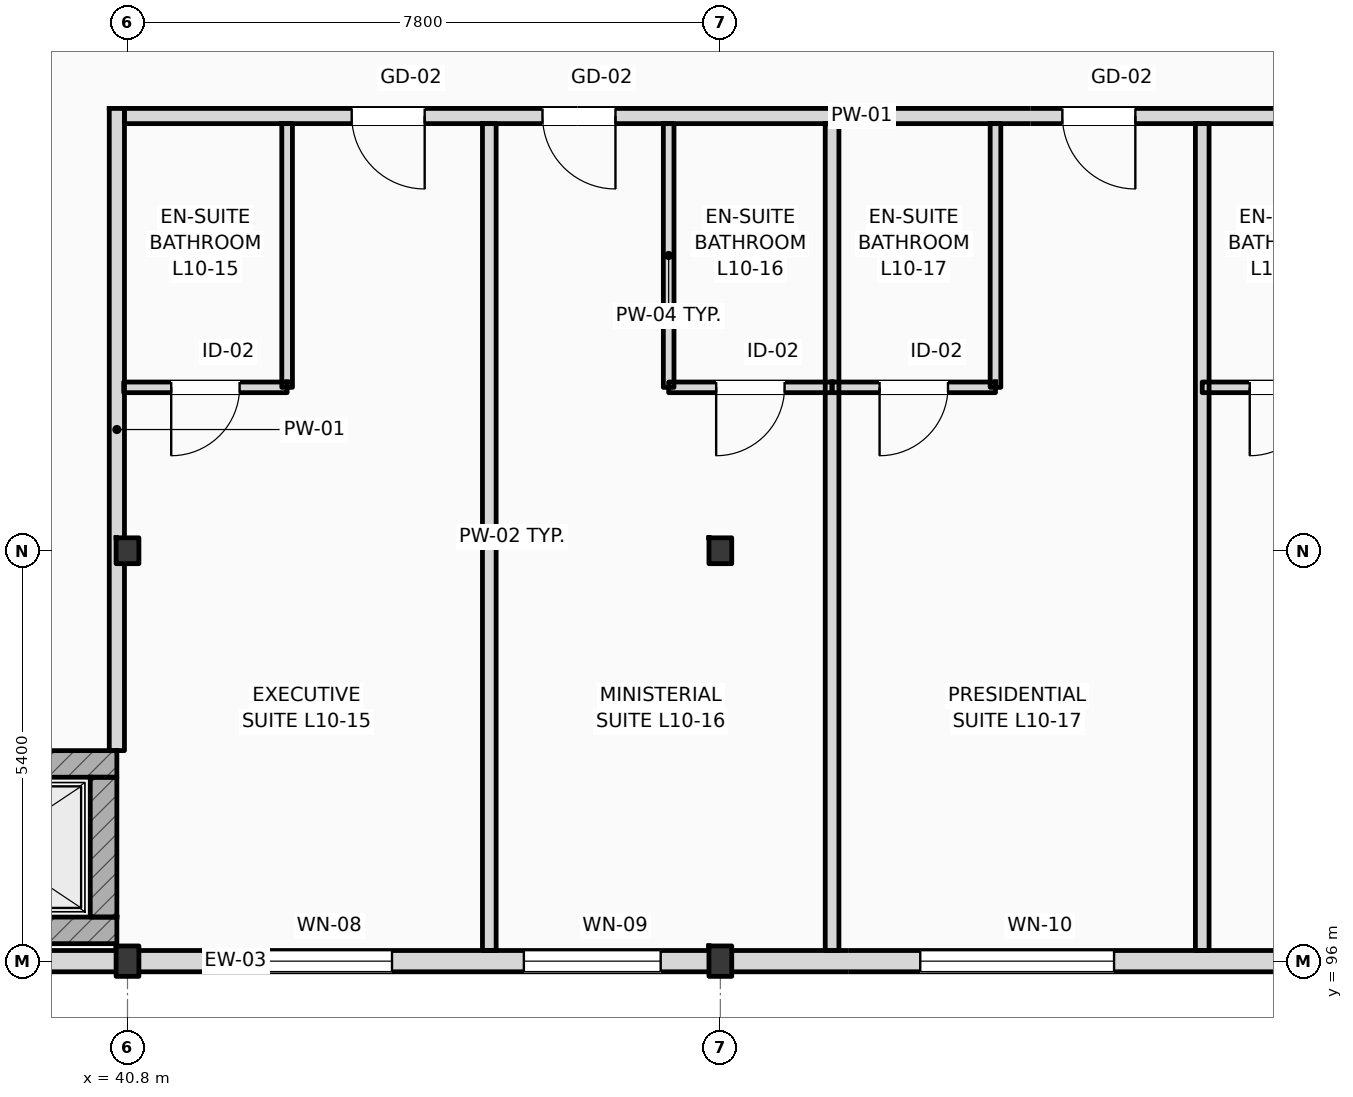
"""IFC4 building model, lengths in metres.
Left out: names, types, materials, properties, quantities, classifications, styles, units other than length and angle.
Written with IfcOpenShell. Run it as: python <this file> out.ifc"""

import sys

from ifc_helpers import new_model, si_unit, direction, frame, frame_2d, origin, origin_2d, place, context, subcontext, project, spatial, rectangle, i_section, extrude, element, fill, save


model = new_model("IFC4")
c1 = context("Model", 3, precision=1e-05, world=origin(), true_north=direction((0.0, 1.0)))
c2 = subcontext(c1, "Body", "Model", "MODEL_VIEW")
j1 = project(units=[si_unit("LENGTHUNIT", "METRE"), si_unit("PLANEANGLEUNIT", "RADIAN")], contexts=[c1])
p1 = place(None, origin())
s1 = spatial("IfcSite", under=j1, at=p1, CompositionType="ELEMENT")
p2 = place(p1, origin())
s2 = spatial("IfcBuilding", under=s1, at=p2, CompositionType="ELEMENT")
p3 = place(p2, frame((0.0, 0.0, 42.6)))
s3 = spatial("IfcBuildingStorey", under=s2, at=p3, CompositionType="ELEMENT", Elevation=42.6)
p4 = place(p3, frame((40.8, 96.0, 0.0), z_axis=(0.0, 0.0, 1.0), x_axis=(1.0, 0.0, 0.0)))
e1 = element("IfcColumn", 1, at=p4, inside=s3, PredefinedType="COLUMN", context=c2, shape_type="SweptSolid", body=[
    extrude(i_section(OverallWidth=0.3, OverallDepth=0.4, WebThickness=0.013, FlangeThickness=0.024, FilletRadius=0.027, at=origin_2d()), origin(), (0.0, 0.0, 1.0), 4.2),
])
p5 = place(p3, frame((40.8, 101.4, 0.0), z_axis=(0.0, 0.0, 1.0), x_axis=(1.0, 0.0, 0.0)))
e2 = element("IfcColumn", 2, at=p5, inside=s3, PredefinedType="COLUMN", context=c2, shape_type="SweptSolid", body=[
    extrude(i_section(OverallWidth=0.3, OverallDepth=0.34, WebThickness=0.012, FlangeThickness=0.021, FilletRadius=0.027, at=origin_2d()), origin(), (0.0, 0.0, 1.0), 4.2),
])
p6 = place(p3, frame((48.6, 96.0, 0.0), z_axis=(0.0, 0.0, 1.0), x_axis=(1.0, 0.0, 0.0)))
e3 = element("IfcColumn", 3, at=p6, inside=s3, PredefinedType="COLUMN", context=c2, shape_type="SweptSolid", body=[
    extrude(i_section(OverallWidth=0.3, OverallDepth=0.4, WebThickness=0.013, FlangeThickness=0.024, FilletRadius=0.027, at=origin_2d()), origin(), (0.0, 0.0, 1.0), 4.2),
])
p7 = place(p3, frame((48.6, 101.4, 0.0), z_axis=(0.0, 0.0, 1.0), x_axis=(1.0, 0.0, 0.0)))
e4 = element("IfcColumn", 4, at=p7, inside=s3, PredefinedType="COLUMN", context=c2, shape_type="SweptSolid", body=[
    extrude(i_section(OverallWidth=0.3, OverallDepth=0.34, WebThickness=0.012, FlangeThickness=0.021, FilletRadius=0.027, at=origin_2d()), origin(), (0.0, 0.0, 1.0), 4.2),
])
p8 = place(p3, frame((25.2, 96.0, 0.0), z_axis=(0.0, 0.0, 1.0), x_axis=(1.0, 0.0, 0.0)))
e5 = element("IfcWall", 5, at=p8, inside=s3, PredefinedType="STANDARD", context=c2, shape_type="SweptSolid", body=[
    extrude(rectangle(XDim=70.2, YDim=0.28, at=frame_2d((35.1, 0.0))), origin(), (0.0, 0.0, 1.0), 3.42),
])
p9 = place(p8, frame((16.83, 0.0, 0.9)))
e6 = element("IfcOpeningElement", 6, at=p9, cuts=e5, PredefinedType="OPENING", context=c2, shape_type="SweptSolid", body=[
    extrude(rectangle(XDim=2.25, YDim=2.15, at=frame_2d((1.125, 1.075))), frame((0.0, 0.15, 0.0), z_axis=(0.0, -1.0, 0.0), x_axis=(1.0, 0.0, 0.0)), (0.0, 0.0, 1.0), 0.3),
])
p10 = place(p8, frame((20.815, 0.0, 0.9)))
e7 = element("IfcOpeningElement", 7, at=p10, cuts=e5, PredefinedType="OPENING", context=c2, shape_type="SweptSolid", body=[
    extrude(rectangle(XDim=1.8, YDim=2.2, at=frame_2d((0.9, 1.1))), frame((0.0, 0.15, 0.0), z_axis=(0.0, -1.0, 0.0), x_axis=(1.0, 0.0, 0.0)), (0.0, 0.0, 1.0), 0.3),
])
p11 = place(p8, frame((26.03, 0.0, 0.9)))
e8 = element("IfcOpeningElement", 8, at=p11, cuts=e5, PredefinedType="OPENING", context=c2, shape_type="SweptSolid", body=[
    extrude(rectangle(XDim=2.55, YDim=2.25, at=frame_2d((1.275, 1.125))), frame((0.0, 0.15, 0.0), z_axis=(0.0, -1.0, 0.0), x_axis=(1.0, 0.0, 0.0)), (0.0, 0.0, 1.0), 0.3),
])
p12 = place(p8, frame((32.045, 0.0, 0.9)))
e9 = element("IfcOpeningElement", 9, at=p12, cuts=e5, PredefinedType="OPENING", context=c2, shape_type="SweptSolid", body=[
    extrude(rectangle(XDim=1.35, YDim=2.3, at=frame_2d((0.675, 1.15))), frame((0.0, 0.15, 0.0), z_axis=(0.0, -1.0, 0.0), x_axis=(1.0, 0.0, 0.0)), (0.0, 0.0, 1.0), 0.3),
])
p13 = place(p8, frame((35.2, 0.0, 0.9)))
e10 = element("IfcOpeningElement", 10, at=p13, cuts=e5, PredefinedType="OPENING", context=c2, shape_type="SweptSolid", body=[
    extrude(rectangle(XDim=2.85, YDim=2.34, at=frame_2d((1.425, 1.17))), frame((0.0, 0.15, 0.0), z_axis=(0.0, -1.0, 0.0), x_axis=(1.0, 0.0, 0.0)), (0.0, 0.0, 1.0), 0.3),
])
p14 = place(p8, frame((55.544, 0.0, 0.9)))
e11 = element("IfcOpeningElement", 11, at=p14, cuts=e5, PredefinedType="OPENING", context=c2, shape_type="SweptSolid", body=[
    extrude(rectangle(XDim=3.0, YDim=2.34, at=frame_2d((1.5, 1.17))), frame((0.0, 0.15, 0.0), z_axis=(0.0, -1.0, 0.0), x_axis=(1.0, 0.0, 0.0)), (0.0, 0.0, 1.0), 0.3),
])
p15 = place(p8, frame((60.151, 0.0, 0.9)))
e12 = element("IfcOpeningElement", 12, at=p15, cuts=e5, PredefinedType="OPENING", context=c2, shape_type="SweptSolid", body=[
    extrude(rectangle(XDim=1.35, YDim=2.34, at=frame_2d((0.675, 1.17))), frame((0.0, 0.15, 0.0), z_axis=(0.0, -1.0, 0.0), x_axis=(1.0, 0.0, 0.0)), (0.0, 0.0, 1.0), 0.3),
])
p16 = place(p8, frame((65.582, 0.0, 0.9)))
e13 = element("IfcOpeningElement", 13, at=p16, cuts=e5, PredefinedType="OPENING", context=c2, shape_type="SweptSolid", body=[
    extrude(rectangle(XDim=3.4, YDim=2.34, at=frame_2d((1.7, 1.17))), frame((0.0, 0.15, 0.0), z_axis=(0.0, -1.0, 0.0), x_axis=(1.0, 0.0, 0.0)), (0.0, 0.0, 1.0), 0.3),
])
p17 = place(p3, frame((37.67, 98.595, 0.0), z_axis=(0.0, 0.0, 1.0), x_axis=(1.0, 0.0, 0.0)))
e14 = element("IfcWall", 14, at=p17, inside=s3, PredefinedType="SHEAR", context=c2, shape_type="SweptSolid", body=[
    extrude(rectangle(XDim=2.99, YDim=0.35, at=frame_2d((1.495, 0.0))), origin(), (0.0, 0.0, 1.0), 3.94),
])
p18 = place(p17, frame((0.695, 0.0, 0.0)))
e15 = element("IfcOpeningElement", 15, at=p18, cuts=e14, PredefinedType="OPENING", context=c2, shape_type="SweptSolid", body=[
    extrude(rectangle(XDim=1.25, YDim=2.25, at=frame_2d((0.625, 1.125))), frame((0.0, 0.185, 0.0), z_axis=(0.0, -1.0, 0.0), x_axis=(1.0, 0.0, 0.0)), (0.0, 0.0, 1.0), 0.37),
])
p19 = place(p3, frame((37.67, 96.405, 0.0), z_axis=(0.0, 0.0, 1.0), x_axis=(1.0, 0.0, 0.0)))
e16 = element("IfcWall", 16, at=p19, inside=s3, PredefinedType="SHEAR", context=c2, shape_type="SweptSolid", body=[
    extrude(rectangle(XDim=2.99, YDim=0.35, at=frame_2d((1.495, 0.0))), origin(), (0.0, 0.0, 1.0), 3.94),
])
p20 = place(p3, frame((40.485, 96.58, 0.0), z_axis=(0.0, 0.0, 1.0), x_axis=(0.0, 1.0, 0.0)))
e17 = element("IfcWall", 17, at=p20, inside=s3, PredefinedType="SHEAR", context=c2, shape_type="SweptSolid", body=[
    extrude(rectangle(XDim=1.84, YDim=0.35, at=frame_2d((0.92, 0.0))), origin(), (0.0, 0.0, 1.0), 3.57),
])
p21 = place(p3, frame((40.76, 107.12, 0.0), z_axis=(0.0, 0.0, 1.0), x_axis=(1.0, 0.0, 0.0)))
e18 = element("IfcWall", 18, at=p21, inside=s3, PredefinedType="PARTITIONING", context=c2, shape_type="SweptSolid", body=[
    extrude(rectangle(XDim=23.44, YDim=0.2, at=frame_2d((11.72, 0.0))), origin(), (0.0, 0.0, 1.0), 3.94),
])
p22 = place(p21, frame((2.99, 0.0, 0.0)))
e19 = element("IfcOpeningElement", 19, at=p22, cuts=e18, PredefinedType="OPENING", context=c2, shape_type="SweptSolid", body=[
    extrude(rectangle(XDim=0.96, YDim=2.2, at=frame_2d((0.48, 1.1))), frame((0.0, 0.11, 0.0), z_axis=(0.0, -1.0, 0.0), x_axis=(1.0, 0.0, 0.0)), (0.0, 0.0, 1.0), 0.22),
])
p23 = place(p21, frame((5.5, 0.0, 0.0)))
e20 = element("IfcOpeningElement", 20, at=p23, cuts=e18, PredefinedType="OPENING", context=c2, shape_type="SweptSolid", body=[
    extrude(rectangle(XDim=0.96, YDim=2.2, at=frame_2d((0.48, 1.1))), frame((0.0, 0.11, 0.0), z_axis=(0.0, -1.0, 0.0), x_axis=(1.0, 0.0, 0.0)), (0.0, 0.0, 1.0), 0.22),
])
p24 = place(p21, frame((12.34, 0.0, 0.0)))
e21 = element("IfcOpeningElement", 21, at=p24, cuts=e18, PredefinedType="OPENING", context=c2, shape_type="SweptSolid", body=[
    extrude(rectangle(XDim=0.96, YDim=2.2, at=frame_2d((0.48, 1.1))), frame((0.0, 0.11, 0.0), z_axis=(0.0, -1.0, 0.0), x_axis=(1.0, 0.0, 0.0)), (0.0, 0.0, 1.0), 0.22),
])
p25 = place(p21, frame((17.03, 0.0, 0.0)))
e22 = element("IfcOpeningElement", 22, at=p25, cuts=e18, PredefinedType="OPENING", context=c2, shape_type="SweptSolid", body=[
    extrude(rectangle(XDim=0.96, YDim=2.2, at=frame_2d((0.48, 1.1))), frame((0.0, 0.11, 0.0), z_axis=(0.0, -1.0, 0.0), x_axis=(1.0, 0.0, 0.0)), (0.0, 0.0, 1.0), 0.22),
])
p26 = place(p21, frame((19.51, 0.0, 0.0)))
e23 = element("IfcOpeningElement", 23, at=p26, cuts=e18, PredefinedType="OPENING", context=c2, shape_type="SweptSolid", body=[
    extrude(rectangle(XDim=0.96, YDim=2.2, at=frame_2d((0.48, 1.1))), frame((0.0, 0.11, 0.0), z_axis=(0.0, -1.0, 0.0), x_axis=(1.0, 0.0, 0.0)), (0.0, 0.0, 1.0), 0.22),
])
p27 = place(p3, frame((40.66, 98.77, 0.0), z_axis=(0.0, 0.0, 1.0), x_axis=(0.0, 1.0, 0.0)))
e24 = element("IfcWall", 24, at=p27, inside=s3, PredefinedType="PARTITIONING", context=c2, shape_type="SweptSolid", body=[
    extrude(rectangle(XDim=8.45, YDim=0.2, at=frame_2d((4.225, 0.0))), origin(), (0.0, 0.0, 1.0), 3.57),
])
p28 = place(p3, frame((45.56, 96.14, 0.0), z_axis=(0.0, 0.0, 1.0), x_axis=(0.0, 1.0, 0.0)))
e25 = element("IfcWall", 25, at=p28, inside=s3, PredefinedType="PARTITIONING", context=c2, shape_type="SweptSolid", body=[
    extrude(rectangle(XDim=10.88, YDim=0.18, at=frame_2d((5.44, 0.0))), origin(), (0.0, 0.0, 1.0), 3.94),
])
p29 = place(p3, frame((42.9, 103.55, 0.0), z_axis=(0.0, 0.0, 1.0), x_axis=(0.0, 1.0, 0.0)))
e26 = element("IfcWall", 26, at=p29, inside=s3, PredefinedType="PARTITIONING", context=c2, shape_type="SweptSolid", body=[
    extrude(rectangle(XDim=3.47, YDim=0.14, at=frame_2d((1.735, 0.0))), origin(), (0.0, 0.0, 1.0), 3.94),
])
p30 = place(p3, frame((40.75, 103.55, 0.0), z_axis=(0.0, 0.0, 1.0), x_axis=(1.0, 0.0, 0.0)))
e27 = element("IfcWall", 27, at=p30, inside=s3, PredefinedType="PARTITIONING", context=c2, shape_type="SweptSolid", body=[
    extrude(rectangle(XDim=2.15, YDim=0.14, at=frame_2d((1.075, 0.0))), origin(), (0.0, 0.0, 1.0), 3.94),
])
p31 = place(p30, frame((0.625, 0.0, 0.0)))
e28 = element("IfcOpeningElement", 28, at=p31, cuts=e27, PredefinedType="OPENING", context=c2, shape_type="SweptSolid", body=[
    extrude(rectangle(XDim=0.9, YDim=2.1, at=frame_2d((0.45, 1.05))), frame((0.0, 0.08, 0.0), z_axis=(0.0, -1.0, 0.0), x_axis=(1.0, 0.0, 0.0)), (0.0, 0.0, 1.0), 0.16),
])
p32 = place(p3, frame((50.07, 96.14, 0.0), z_axis=(0.0, 0.0, 1.0), x_axis=(0.0, 1.0, 0.0)))
e29 = element("IfcWall", 29, at=p32, inside=s3, PredefinedType="PARTITIONING", context=c2, shape_type="SweptSolid", body=[
    extrude(rectangle(XDim=10.88, YDim=0.18, at=frame_2d((5.44, 0.0))), origin(), (0.0, 0.0, 1.0), 3.94),
])
p33 = place(p3, frame((47.92, 103.55, 0.0), z_axis=(0.0, 0.0, 1.0), x_axis=(0.0, 1.0, 0.0)))
e30 = element("IfcWall", 30, at=p33, inside=s3, PredefinedType="PARTITIONING", context=c2, shape_type="SweptSolid", body=[
    extrude(rectangle(XDim=3.47, YDim=0.14, at=frame_2d((1.735, 0.0))), origin(), (0.0, 0.0, 1.0), 3.94),
])
p34 = place(p3, frame((47.92, 103.55, 0.0), z_axis=(0.0, 0.0, 1.0), x_axis=(1.0, 0.0, 0.0)))
e31 = element("IfcWall", 31, at=p34, inside=s3, PredefinedType="PARTITIONING", context=c2, shape_type="SweptSolid", body=[
    extrude(rectangle(XDim=2.15, YDim=0.14, at=frame_2d((1.075, 0.0))), origin(), (0.0, 0.0, 1.0), 3.94),
])
p35 = place(p34, frame((0.625, 0.0, 0.0)))
e32 = element("IfcOpeningElement", 32, at=p35, cuts=e31, PredefinedType="OPENING", context=c2, shape_type="SweptSolid", body=[
    extrude(rectangle(XDim=0.9, YDim=2.1, at=frame_2d((0.45, 1.05))), frame((0.0, 0.08, 0.0), z_axis=(0.0, -1.0, 0.0), x_axis=(1.0, 0.0, 0.0)), (0.0, 0.0, 1.0), 0.16),
])
p36 = place(p3, frame((54.94, 96.14, 0.0), z_axis=(0.0, 0.0, 1.0), x_axis=(0.0, 1.0, 0.0)))
e33 = element("IfcWall", 33, at=p36, inside=s3, PredefinedType="PARTITIONING", context=c2, shape_type="SweptSolid", body=[
    extrude(rectangle(XDim=10.88, YDim=0.18, at=frame_2d((5.44, 0.0))), origin(), (0.0, 0.0, 1.0), 3.94),
])
p37 = place(p3, frame((52.22, 103.55, 0.0), z_axis=(0.0, 0.0, 1.0), x_axis=(0.0, 1.0, 0.0)))
e34 = element("IfcWall", 34, at=p37, inside=s3, PredefinedType="PARTITIONING", context=c2, shape_type="SweptSolid", body=[
    extrude(rectangle(XDim=3.47, YDim=0.14, at=frame_2d((1.735, 0.0))), origin(), (0.0, 0.0, 1.0), 3.94),
])
p38 = place(p3, frame((50.07, 103.55, 0.0), z_axis=(0.0, 0.0, 1.0), x_axis=(1.0, 0.0, 0.0)))
e35 = element("IfcWall", 35, at=p38, inside=s3, PredefinedType="PARTITIONING", context=c2, shape_type="SweptSolid", body=[
    extrude(rectangle(XDim=2.15, YDim=0.14, at=frame_2d((1.075, 0.0))), origin(), (0.0, 0.0, 1.0), 3.94),
])
p39 = place(p38, frame((0.625, 0.0, 0.0)))
e36 = element("IfcOpeningElement", 36, at=p39, cuts=e35, PredefinedType="OPENING", context=c2, shape_type="SweptSolid", body=[
    extrude(rectangle(XDim=0.9, YDim=2.1, at=frame_2d((0.45, 1.05))), frame((0.0, 0.08, 0.0), z_axis=(0.0, -1.0, 0.0), x_axis=(1.0, 0.0, 0.0)), (0.0, 0.0, 1.0), 0.16),
])
p40 = place(p3, frame((54.94, 103.55, 0.0), z_axis=(0.0, 0.0, 1.0), x_axis=(1.0, 0.0, 0.0)))
e37 = element("IfcWall", 37, at=p40, inside=s3, PredefinedType="PARTITIONING", context=c2, shape_type="SweptSolid", body=[
    extrude(rectangle(XDim=2.15, YDim=0.14, at=frame_2d((1.075, 0.0))), origin(), (0.0, 0.0, 1.0), 3.94),
])
p41 = place(p40, frame((0.625, 0.0, 0.0)))
e38 = element("IfcOpeningElement", 38, at=p41, cuts=e37, PredefinedType="OPENING", context=c2, shape_type="SweptSolid", body=[
    extrude(rectangle(XDim=0.9, YDim=2.1, at=frame_2d((0.45, 1.05))), frame((0.0, 0.08, 0.0), z_axis=(0.0, -1.0, 0.0), x_axis=(1.0, 0.0, 0.0)), (0.0, 0.0, 1.0), 0.16),
])
p42 = place(p9, origin())
e39 = element("IfcWindow", 39, at=p42, inside=s3, PartitioningType="DOUBLE_PANEL_VERTICAL", PredefinedType="WINDOW", context=c2, shape_type="SweptSolid", body=[
    extrude(rectangle(XDim=2.25, YDim=2.15, at=frame_2d((1.125, 1.075))), frame((0.0, 0.03, 0.0), z_axis=(0.0, -1.0, 0.0), x_axis=(1.0, 0.0, 0.0)), (0.0, 0.0, 1.0), 0.06),
])
fill(e6, e39)
p43 = place(p10, origin())
e40 = element("IfcWindow", 40, at=p43, inside=s3, PartitioningType="DOUBLE_PANEL_VERTICAL", PredefinedType="WINDOW", context=c2, shape_type="SweptSolid", body=[
    extrude(rectangle(XDim=1.8, YDim=2.2, at=frame_2d((0.9, 1.1))), frame((0.0, 0.03, 0.0), z_axis=(0.0, -1.0, 0.0), x_axis=(1.0, 0.0, 0.0)), (0.0, 0.0, 1.0), 0.06),
])
fill(e7, e40)
p44 = place(p11, origin())
e41 = element("IfcWindow", 41, at=p44, inside=s3, PartitioningType="DOUBLE_PANEL_VERTICAL", PredefinedType="WINDOW", context=c2, shape_type="SweptSolid", body=[
    extrude(rectangle(XDim=2.55, YDim=2.25, at=frame_2d((1.275, 1.125))), frame((0.0, 0.03, 0.0), z_axis=(0.0, -1.0, 0.0), x_axis=(1.0, 0.0, 0.0)), (0.0, 0.0, 1.0), 0.06),
])
fill(e8, e41)
p45 = place(p22, frame((0.96, 0.0, 0.0), z_axis=(0.0, 0.0, 1.0), x_axis=(-1.0, 0.0, 0.0)))
e42 = element("IfcDoor", 42, at=p45, inside=s3, OperationType="SINGLE_SWING_RIGHT", PredefinedType="DOOR", context=c2, shape_type="SweptSolid", body=[
    extrude(rectangle(XDim=0.96, YDim=2.2, at=frame_2d((0.48, 1.1))), frame((0.0, 0.025, 0.0), z_axis=(0.0, -1.0, 0.0), x_axis=(1.0, 0.0, 0.0)), (0.0, 0.0, 1.0), 0.05),
])
fill(e19, e42)
p46 = place(p31, frame((0.9, 0.0, 0.0), z_axis=(0.0, 0.0, 1.0), x_axis=(-1.0, 0.0, 0.0)))
e43 = element("IfcDoor", 43, at=p46, inside=s3, OperationType="SINGLE_SWING_LEFT", PredefinedType="DOOR", context=c2, shape_type="SweptSolid", body=[
    extrude(rectangle(XDim=0.9, YDim=2.1, at=frame_2d((0.45, 1.05))), frame((0.0, 0.025, 0.0), z_axis=(0.0, -1.0, 0.0), x_axis=(1.0, 0.0, 0.0)), (0.0, 0.0, 1.0), 0.05),
])
fill(e28, e43)
p47 = place(p23, frame((0.96, 0.0, 0.0), z_axis=(0.0, 0.0, 1.0), x_axis=(-1.0, 0.0, 0.0)))
e44 = element("IfcDoor", 44, at=p47, inside=s3, OperationType="SINGLE_SWING_RIGHT", PredefinedType="DOOR", context=c2, shape_type="SweptSolid", body=[
    extrude(rectangle(XDim=0.96, YDim=2.2, at=frame_2d((0.48, 1.1))), frame((0.0, 0.025, 0.0), z_axis=(0.0, -1.0, 0.0), x_axis=(1.0, 0.0, 0.0)), (0.0, 0.0, 1.0), 0.05),
])
fill(e20, e44)
p48 = place(p35, frame((0.9, 0.0, 0.0), z_axis=(0.0, 0.0, 1.0), x_axis=(-1.0, 0.0, 0.0)))
e45 = element("IfcDoor", 45, at=p48, inside=s3, OperationType="SINGLE_SWING_LEFT", PredefinedType="DOOR", context=c2, shape_type="SweptSolid", body=[
    extrude(rectangle(XDim=0.9, YDim=2.1, at=frame_2d((0.45, 1.05))), frame((0.0, 0.025, 0.0), z_axis=(0.0, -1.0, 0.0), x_axis=(1.0, 0.0, 0.0)), (0.0, 0.0, 1.0), 0.05),
])
fill(e32, e45)
p49 = place(p24, frame((0.96, 0.0, 0.0), z_axis=(0.0, 0.0, 1.0), x_axis=(-1.0, 0.0, 0.0)))
e46 = element("IfcDoor", 46, at=p49, inside=s3, OperationType="SINGLE_SWING_RIGHT", PredefinedType="DOOR", context=c2, shape_type="SweptSolid", body=[
    extrude(rectangle(XDim=0.96, YDim=2.2, at=frame_2d((0.48, 1.1))), frame((0.0, 0.025, 0.0), z_axis=(0.0, -1.0, 0.0), x_axis=(1.0, 0.0, 0.0)), (0.0, 0.0, 1.0), 0.05),
])
fill(e21, e46)
p50 = place(p39, frame((0.9, 0.0, 0.0), z_axis=(0.0, 0.0, 1.0), x_axis=(-1.0, 0.0, 0.0)))
e47 = element("IfcDoor", 47, at=p50, inside=s3, OperationType="SINGLE_SWING_LEFT", PredefinedType="DOOR", context=c2, shape_type="SweptSolid", body=[
    extrude(rectangle(XDim=0.9, YDim=2.1, at=frame_2d((0.45, 1.05))), frame((0.0, 0.025, 0.0), z_axis=(0.0, -1.0, 0.0), x_axis=(1.0, 0.0, 0.0)), (0.0, 0.0, 1.0), 0.05),
])
fill(e36, e47)
p51 = place(p41, frame((0.9, 0.0, 0.0), z_axis=(0.0, 0.0, 1.0), x_axis=(-1.0, 0.0, 0.0)))
e48 = element("IfcDoor", 48, at=p51, inside=s3, OperationType="SINGLE_SWING_LEFT", PredefinedType="DOOR", context=c2, shape_type="SweptSolid", body=[
    extrude(rectangle(XDim=0.9, YDim=2.1, at=frame_2d((0.45, 1.05))), frame((0.0, 0.025, 0.0), z_axis=(0.0, -1.0, 0.0), x_axis=(1.0, 0.0, 0.0)), (0.0, 0.0, 1.0), 0.05),
])
fill(e38, e48)
save(model, sys.argv[1])
